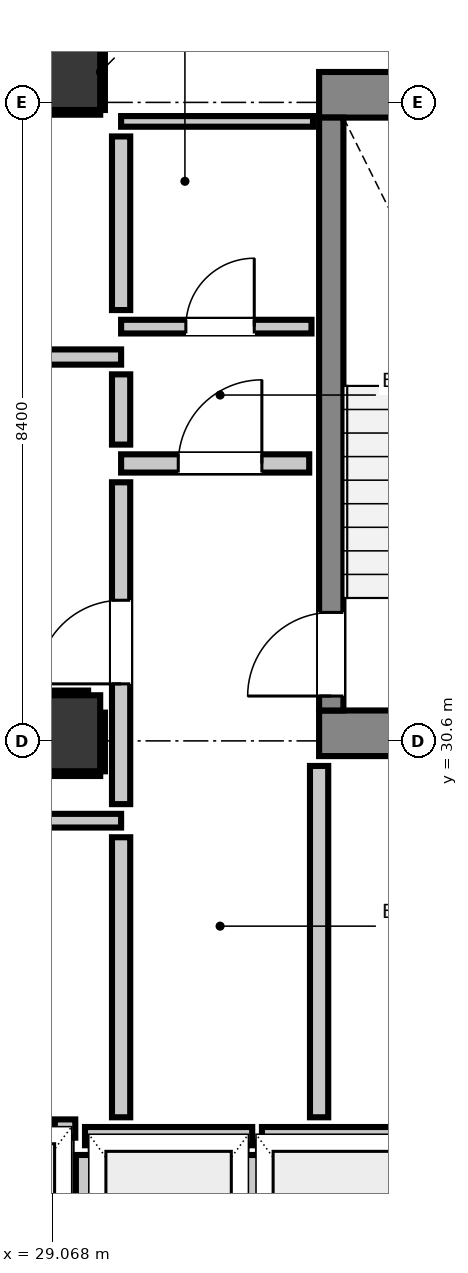
"""IFC4 building model, lengths in metres.
Left out: names, types, materials, properties, quantities, classifications, styles, units other than length and angle.
Written with IfcOpenShell. Run it as: python <this file> out.ifc"""

import sys

from ifc_helpers import new_model, si_unit, direction, frame, frame_2d, origin, origin_2d, place, context, subcontext, project, spatial, rectangle, extrude, element, fill, save


model = new_model("IFC4")
c1 = context("Model", 3, precision=1e-05, world=origin(), true_north=direction((0.0, 1.0)))
c2 = subcontext(c1, "Body", "Model", "MODEL_VIEW")
j1 = project(units=[si_unit("LENGTHUNIT", "METRE"), si_unit("PLANEANGLEUNIT", "RADIAN")], contexts=[c1])
p1 = place(None, origin())
s1 = spatial("IfcSite", under=j1, at=p1, CompositionType="ELEMENT")
p2 = place(p1, origin())
s2 = spatial("IfcBuilding", under=s1, at=p2, CompositionType="ELEMENT")
p3 = place(p2, frame((0.0, 0.0, 22.0)))
s3 = spatial("IfcBuildingStorey", under=s2, at=p3, CompositionType="ELEMENT", Elevation=22.0)
p4 = place(p3, frame((29.2, 39.4, 0.0), z_axis=(0.0, 0.0, 1.0), x_axis=(1.0, 0.0, 0.0)))
e1 = element("IfcColumn", 1, at=p4, inside=s3, PredefinedType="COLUMN", context=c2, shape_type="SweptSolid", body=[
    extrude(rectangle(XDim=1.0, YDim=1.0, at=origin_2d()), origin(), (0.0, 0.0, 1.0), 3.32),
])
p5 = place(p3, frame((32.58, 39.1, 0.0), z_axis=(0.0, 0.0, 1.0), x_axis=(1.0, 0.0, 0.0)))
e2 = element("IfcWall", 2, at=p5, inside=s3, PredefinedType="SHEAR", context=c2, shape_type="SweptSolid", body=[
    extrude(rectangle(XDim=4.08, YDim=0.6, at=frame_2d((2.04, 0.0))), origin(), (0.0, 0.0, 1.0), 3.32),
])
p6 = place(p3, frame((32.58, 30.7, 0.0), z_axis=(0.0, 0.0, 1.0), x_axis=(1.0, 0.0, 0.0)))
e3 = element("IfcWall", 3, at=p6, inside=s3, PredefinedType="SHEAR", context=c2, shape_type="SweptSolid", body=[
    extrude(rectangle(XDim=3.415, YDim=0.6, at=frame_2d((1.708, 0.0))), origin(), (0.0, 0.0, 1.0), 3.32),
])
p7 = place(p3, frame((32.74, 31.0, 0.0), z_axis=(0.0, 0.0, 1.0), x_axis=(0.0, 1.0, 0.0)))
e4 = element("IfcWall", 4, at=p7, inside=s3, PredefinedType="SHEAR", context=c2, shape_type="SweptSolid", body=[
    extrude(rectangle(XDim=7.8, YDim=0.32, at=frame_2d((3.9, 0.0))), origin(), (0.0, 0.0, 1.0), 3.32),
])
p8 = place(p7, frame((0.19, 0.0, 0.0)))
e5 = element("IfcOpeningElement", 5, at=p8, cuts=e4, PredefinedType="OPENING", context=c2, shape_type="SweptSolid", body=[
    extrude(rectangle(XDim=1.1, YDim=2.15, at=frame_2d((0.55, 1.075))), frame((0.0, 0.17, 0.0), z_axis=(0.0, -1.0, 0.0), x_axis=(1.0, 0.0, 0.0)), (0.0, 0.0, 1.0), 0.34),
])
p9 = place(p3, frame((29.2, 30.7, 0.0), z_axis=(0.0, 0.0, 1.0), x_axis=(1.0, 0.0, 0.0)))
e6 = element("IfcColumn", 6, at=p9, inside=s3, PredefinedType="COLUMN", context=c2, shape_type="SweptSolid", body=[
    extrude(rectangle(XDim=1.0, YDim=1.0, at=origin_2d()), origin(), (0.0, 0.0, 1.0), 3.32),
])
p10 = place(p3, frame((29.5, 25.4, 0.0), z_axis=(0.0, 0.0, 1.0), x_axis=(1.0, 0.0, 0.0)))
e7 = element("IfcWall", 7, at=p10, inside=s3, PredefinedType="PARTITIONING", context=c2, shape_type="SweptSolid", body=[
    extrude(rectangle(XDim=2.2, YDim=0.24, at=frame_2d((1.1, 0.0))), origin(), (0.0, 0.0, 1.0), 3.06),
])
p11 = place(p3, frame((29.5, 22.632, 0.0), z_axis=(0.0, 0.0, 1.0), x_axis=(0.0, 1.0, 0.0)))
e8 = element("IfcWall", 8, at=p11, inside=s3, PredefinedType="PARTITIONING", context=c2, shape_type="SweptSolid", body=[
    extrude(rectangle(XDim=2.52, YDim=0.24, at=frame_2d((1.26, 0.0))), origin(), (0.0, 0.0, 1.0), 2.295),
])
p12 = place(p3, frame((31.7, 22.73, 0.0), z_axis=(0.0, 0.0, 1.0), x_axis=(0.0, 1.0, 0.0)))
e9 = element("IfcWall", 9, at=p12, inside=s3, PredefinedType="PARTITIONING", context=c2, shape_type="SweptSolid", body=[
    extrude(rectangle(XDim=2.422, YDim=0.24, at=frame_2d((1.211, 0.0))), origin(), (0.0, 0.0, 1.0), 3.06),
])
p13 = place(p3, frame((31.828, 25.4, 0.0), z_axis=(0.0, 0.0, 1.0), x_axis=(1.0, 0.0, 0.0)))
e10 = element("IfcWall", 10, at=p13, inside=s3, PredefinedType="PARTITIONING", context=c2, shape_type="SweptSolid", body=[
    extrude(rectangle(XDim=2.072, YDim=0.24, at=frame_2d((1.036, 0.0))), origin(), (0.0, 0.0, 1.0), 3.06),
])
p14 = place(p3, frame((29.103, 25.5, 0.0), z_axis=(0.0, 0.0, 1.0), x_axis=(1.0, 0.0, 0.0)))
e11 = element("IfcWall", 11, at=p14, inside=s3, PredefinedType="PARTITIONING", context=c2, shape_type="SweptSolid", body=[
    extrude(rectangle(XDim=0.269, YDim=0.24, at=frame_2d((0.135, 0.0))), origin(), (0.0, 0.0, 1.0), 3.06),
])
p15 = place(p3, frame((29.975, 34.25, 0.0), z_axis=(0.0, 0.0, 1.0), x_axis=(1.0, 0.0, 0.0)))
e12 = element("IfcWall", 12, at=p15, inside=s3, PredefinedType="PARTITIONING", context=c2, shape_type="SweptSolid", body=[
    extrude(rectangle(XDim=2.475, YDim=0.24, at=frame_2d((1.237, 0.0))), origin(), (0.0, 0.0, 1.0), 3.06),
])
p16 = place(p15, frame((0.752, 0.0, 0.0)))
e13 = element("IfcOpeningElement", 13, at=p16, cuts=e12, PredefinedType="OPENING", context=c2, shape_type="SweptSolid", body=[
    extrude(rectangle(XDim=1.1, YDim=2.15, at=frame_2d((0.55, 1.075))), frame((0.0, 0.13, 0.0), z_axis=(0.0, -1.0, 0.0), x_axis=(1.0, 0.0, 0.0)), (0.0, 0.0, 1.0), 0.26),
])
p17 = place(p3, frame((28.604, 35.65, 0.0), z_axis=(0.0, 0.0, 1.0), x_axis=(1.0, 0.0, 0.0)))
e14 = element("IfcWall", 14, at=p17, inside=s3, PredefinedType="PARTITIONING", context=c2, shape_type="SweptSolid", body=[
    extrude(rectangle(XDim=1.371, YDim=0.2, at=frame_2d((0.686, 0.0))), origin(), (0.0, 0.0, 1.0), 3.06),
])
p18 = place(p3, frame((20.65, 29.55, 0.0), z_axis=(0.0, 0.0, 1.0), x_axis=(1.0, 0.0, 0.0)))
e15 = element("IfcWall", 15, at=p18, inside=s3, PredefinedType="PARTITIONING", context=c2, shape_type="SweptSolid", body=[
    extrude(rectangle(XDim=9.325, YDim=0.18, at=frame_2d((4.663, 0.0))), origin(), (0.0, 0.0, 1.0), 3.06),
])
p19 = place(p3, frame((29.975, 36.05, 0.0), z_axis=(0.0, 0.0, 1.0), x_axis=(1.0, 0.0, 0.0)))
e16 = element("IfcWall", 16, at=p19, inside=s3, PredefinedType="PARTITIONING", context=c2, shape_type="SweptSolid", body=[
    extrude(rectangle(XDim=2.505, YDim=0.18, at=frame_2d((1.252, 0.0))), origin(), (0.0, 0.0, 1.0), 3.06),
])
p20 = place(p19, frame((0.852, 0.0, 0.0)))
e17 = element("IfcOpeningElement", 17, at=p20, cuts=e16, PredefinedType="OPENING", context=c2, shape_type="SweptSolid", body=[
    extrude(rectangle(XDim=0.9, YDim=2.1, at=frame_2d((0.45, 1.05))), frame((0.0, 0.1, 0.0), z_axis=(0.0, -1.0, 0.0), x_axis=(1.0, 0.0, 0.0)), (0.0, 0.0, 1.0), 0.2),
])
p21 = place(p3, frame((29.975, 38.75, 0.0), z_axis=(0.0, 0.0, 1.0), x_axis=(1.0, 0.0, 0.0)))
e18 = element("IfcWall", 18, at=p21, inside=s3, PredefinedType="PARTITIONING", context=c2, shape_type="SweptSolid", body=[
    extrude(rectangle(XDim=2.525, YDim=0.14, at=frame_2d((1.262, 0.0))), origin(), (0.0, 0.0, 1.0), 3.06),
])
p22 = place(p3, frame((29.975, 25.648, 0.0), z_axis=(0.0, 0.0, 1.0), x_axis=(0.0, 1.0, 0.0)))
e19 = element("IfcWall", 19, at=p22, inside=s3, PredefinedType="PARTITIONING", context=c2, shape_type="SweptSolid", body=[
    extrude(rectangle(XDim=3.684, YDim=0.24, at=frame_2d((1.842, 0.0))), origin(), (0.0, 0.0, 1.0), 3.06),
])
p23 = place(p3, frame((29.975, 29.768, 0.0), z_axis=(0.0, 0.0, 1.0), x_axis=(0.0, 1.0, 0.0)))
e20 = element("IfcWall", 20, at=p23, inside=s3, PredefinedType="PARTITIONING", context=c2, shape_type="SweptSolid", body=[
    extrude(rectangle(XDim=4.234, YDim=0.24, at=frame_2d((2.117, 0.0))), origin(), (0.0, 0.0, 1.0), 3.06),
])
p24 = place(p23, frame((1.582, 0.0, 0.0)))
e21 = element("IfcOpeningElement", 21, at=p24, cuts=e20, PredefinedType="OPENING", context=c2, shape_type="SweptSolid", body=[
    extrude(rectangle(XDim=1.1, YDim=2.15, at=frame_2d((0.55, 1.075))), frame((0.0, 0.13, 0.0), z_axis=(0.0, -1.0, 0.0), x_axis=(1.0, 0.0, 0.0)), (0.0, 0.0, 1.0), 0.26),
])
p25 = place(p3, frame((29.975, 34.498, 0.0), z_axis=(0.0, 0.0, 1.0), x_axis=(0.0, 1.0, 0.0)))
e22 = element("IfcWall", 22, at=p25, inside=s3, PredefinedType="PARTITIONING", context=c2, shape_type="SweptSolid", body=[
    extrude(rectangle(XDim=0.924, YDim=0.24, at=frame_2d((0.462, 0.0))), origin(), (0.0, 0.0, 1.0), 3.06),
])
p26 = place(p3, frame((29.975, 36.268, 0.0), z_axis=(0.0, 0.0, 1.0), x_axis=(0.0, 1.0, 0.0)))
e23 = element("IfcWall", 23, at=p26, inside=s3, PredefinedType="PARTITIONING", context=c2, shape_type="SweptSolid", body=[
    extrude(rectangle(XDim=2.284, YDim=0.24, at=frame_2d((1.142, 0.0))), origin(), (0.0, 0.0, 1.0), 3.06),
])
p27 = place(p3, frame((32.58, 25.648, 0.0), z_axis=(0.0, 0.0, 1.0), x_axis=(0.0, 1.0, 0.0)))
e24 = element("IfcWall", 24, at=p27, inside=s3, PredefinedType="PARTITIONING", context=c2, shape_type="SweptSolid", body=[
    extrude(rectangle(XDim=4.622, YDim=0.24, at=frame_2d((2.311, 0.0))), origin(), (0.0, 0.0, 1.0), 3.06),
])
p28 = place(p3, frame((28.71, 38.868, 0.0), z_axis=(0.0, 0.0, 1.0), x_axis=(1.0, 0.0, 0.0)))
e25 = element("IfcWall", 25, at=p28, inside=s3, PredefinedType="PARTITIONING", context=c2, shape_type="SweptSolid", body=[
    extrude(rectangle(XDim=0.99, YDim=0.06, at=frame_2d((0.495, 0.0))), origin(), (0.0, 0.0, 1.0), 1.45),
])
for number, where, z_axis, x_axis in (
    (26, (29.732, 38.9, 0.0), (0.0, 0.0, 1.0), (0.0, 1.0, 0.0)),
    (27, (28.7, 30.168, 0.0), (0.0, 0.0, 1.0), (1.0, 0.0, 0.0)),
):
    element("IfcWall", number, at=place(p3, frame(where, z_axis=z_axis, x_axis=x_axis)), inside=s3, PredefinedType="PARTITIONING", context=c2, shape_type="SweptSolid", body=[
        extrude(rectangle(XDim=1.0, YDim=0.06, at=frame_2d((0.5, 0.0))), origin(), (0.0, 0.0, 1.0), 1.45),
    ])
p29 = place(p3, frame((28.7, 31.232, 0.0), z_axis=(0.0, 0.0, 1.0), x_axis=(1.0, 0.0, 0.0)))
e28 = element("IfcWall", 28, at=p29, inside=s3, PredefinedType="PARTITIONING", context=c2, shape_type="SweptSolid", body=[
    extrude(rectangle(XDim=0.841, YDim=0.06, at=frame_2d((0.42, 0.0))), origin(), (0.0, 0.0, 1.0), 1.45),
])
p30 = place(p3, frame((29.732, 30.2, 0.0), z_axis=(0.0, 0.0, 1.0), x_axis=(0.0, 1.0, 0.0)))
e29 = element("IfcWall", 29, at=p30, inside=s3, PredefinedType="PARTITIONING", context=c2, shape_type="SweptSolid", body=[
    extrude(rectangle(XDim=0.772, YDim=0.06, at=frame_2d((0.386, 0.0))), origin(), (0.0, 0.0, 1.0), 1.45),
])
p31 = place(p8, origin())
e30 = element("IfcDoor", 30, at=p31, inside=s3, OperationType="SINGLE_SWING_LEFT", PredefinedType="DOOR", context=c2, shape_type="SweptSolid", body=[
    extrude(rectangle(XDim=1.1, YDim=2.15, at=frame_2d((0.55, 1.075))), frame((0.0, 0.025, 0.0), z_axis=(0.0, -1.0, 0.0), x_axis=(1.0, 0.0, 0.0)), (0.0, 0.0, 1.0), 0.05),
])
fill(e5, e30)
p32 = place(p24, origin())
e31 = element("IfcDoor", 31, at=p32, inside=s3, OperationType="SINGLE_SWING_LEFT", PredefinedType="DOOR", context=c2, shape_type="SweptSolid", body=[
    extrude(rectangle(XDim=1.1, YDim=2.15, at=frame_2d((0.55, 1.075))), frame((0.0, 0.025, 0.0), z_axis=(0.0, -1.0, 0.0), x_axis=(1.0, 0.0, 0.0)), (0.0, 0.0, 1.0), 0.05),
])
fill(e21, e31)
p33 = place(p16, origin())
e32 = element("IfcDoor", 32, at=p33, inside=s3, OperationType="SINGLE_SWING_RIGHT", PredefinedType="DOOR", context=c2, shape_type="SweptSolid", body=[
    extrude(rectangle(XDim=1.1, YDim=2.15, at=frame_2d((0.55, 1.075))), frame((0.0, 0.025, 0.0), z_axis=(0.0, -1.0, 0.0), x_axis=(1.0, 0.0, 0.0)), (0.0, 0.0, 1.0), 0.05),
])
fill(e13, e32)
p34 = place(p20, origin())
e33 = element("IfcDoor", 33, at=p34, inside=s3, OperationType="SINGLE_SWING_RIGHT", PredefinedType="DOOR", context=c2, shape_type="SweptSolid", body=[
    extrude(rectangle(XDim=0.9, YDim=2.1, at=frame_2d((0.45, 1.05))), frame((0.0, 0.025, 0.0), z_axis=(0.0, -1.0, 0.0), x_axis=(1.0, 0.0, 0.0)), (0.0, 0.0, 1.0), 0.05),
])
fill(e17, e33)
save(model, sys.argv[1])
